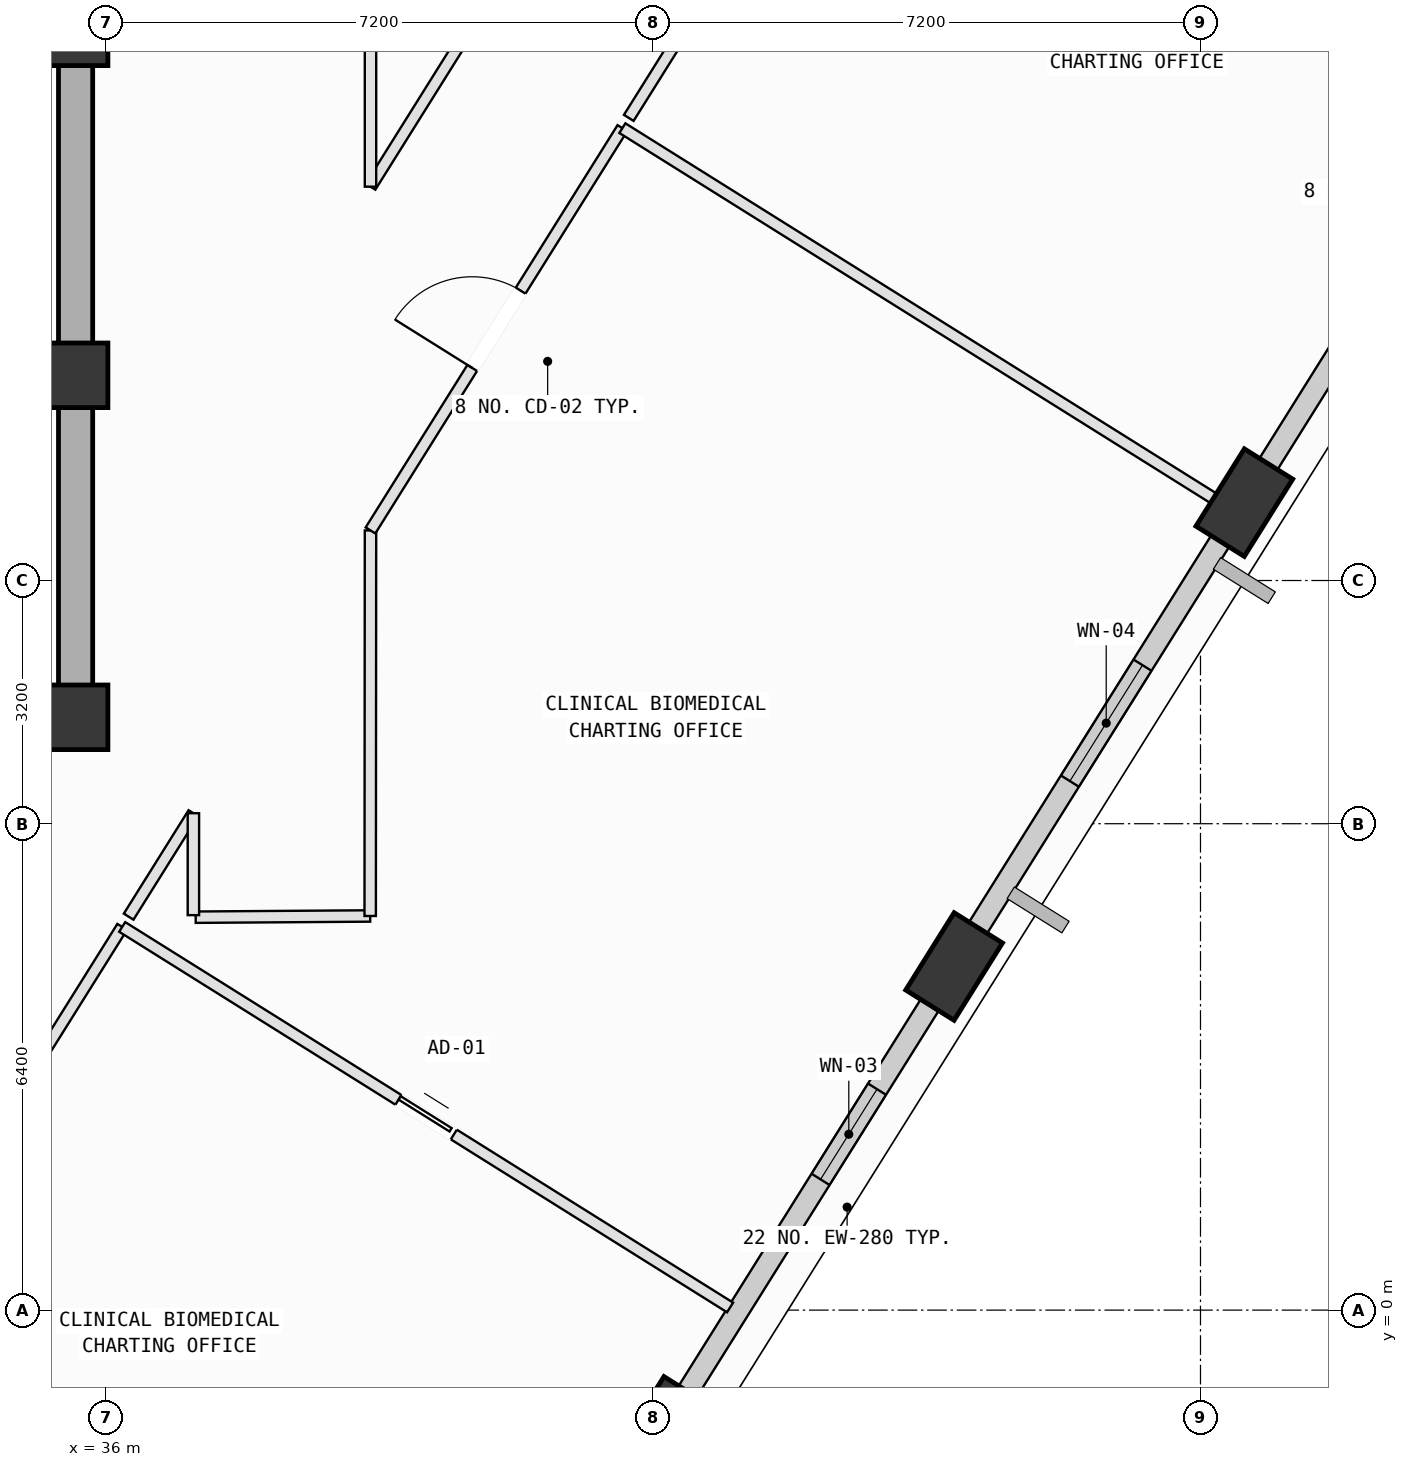
"""IFC4 building model, lengths in metres.
Left out: names, types, materials, properties, quantities, classifications, styles, units other than length and angle.
Written with IfcOpenShell. Run it as: python <this file> out.ifc"""

import sys

from ifc_helpers import new_model, si_unit, direction, frame, frame_2d, origin, origin_2d, place, context, subcontext, project, spatial, rectangle, extrude, element, fill, save


model = new_model("IFC4")
c1 = context("Model", 3, precision=1e-05, world=origin(), true_north=direction((0.0, 1.0)))
c2 = subcontext(c1, "Body", "Model", "MODEL_VIEW")
j1 = project(units=[si_unit("LENGTHUNIT", "METRE"), si_unit("PLANEANGLEUNIT", "RADIAN")], contexts=[c1])
p1 = place(None, origin())
s1 = spatial("IfcSite", under=j1, at=p1, CompositionType="ELEMENT")
p2 = place(p1, origin())
s2 = spatial("IfcBuilding", under=s1, at=p2, CompositionType="ELEMENT")
p3 = place(p2, frame((0.0, 0.0, 272.6)))
s3 = spatial("IfcBuildingStorey", under=s2, at=p3, CompositionType="ELEMENT", Elevation=272.6)
for number, where, z_axis, x_axis in (
    (1, (35.6, 7.8, 0.0), (0.0, 0.0, 1.0), (1.0, 0.0, 0.0)),
    (2, (35.6, 12.3, 0.0), (0.0, 0.0, 1.0), (1.0, 0.0, 0.0)),
    (3, (35.6, 16.8, 0.0), (0.0, 0.0, 1.0), (1.0, 0.0, 0.0)),
):
    element("IfcColumn", number, at=place(p3, frame(where, z_axis=z_axis, x_axis=x_axis)), inside=s3, PredefinedType="COLUMN", context=c2, shape_type="SweptSolid", body=[
        extrude(rectangle(XDim=0.85, YDim=0.85, at=origin_2d()), origin(), (0.0, 0.0, 1.0), 4.0),
    ])
p4 = place(p3, frame((43.341, -1.582, 0.084), z_axis=(0.108305309246, 0.040955268542, 0.99327369137), x_axis=(-0.97515853256, 0.19857987532, 0.098142088287)))
e4 = element("IfcColumn", 4, at=p4, inside=s3, PredefinedType="COLUMN", context=c2, shape_type="SweptSolid", body=[
    extrude(rectangle(XDim=1.2, YDim=0.75, at=origin_2d()), origin(), (0.0, 0.0, 1.0), 3.94),
])
p5 = place(p3, frame((47.158, 4.521, 0.073), z_axis=(0.083183965211, 0.05657004777, 0.994927262481), x_axis=(-0.995728841282, -0.035412464892, 0.085264482463)))
e5 = element("IfcColumn", 5, at=p5, inside=s3, PredefinedType="COLUMN", context=c2, shape_type="SweptSolid", body=[
    extrude(rectangle(XDim=1.2, YDim=0.75, at=origin_2d()), origin(), (0.0, 0.0, 1.0), 3.945),
])
p6 = place(p3, frame((50.977, 10.625, 0.068), z_axis=(0.05795606308, 0.072182204498, 0.995706193667), x_axis=(-0.942163536267, -0.325840094684, 0.078460841345)))
e6 = element("IfcColumn", 6, at=p6, inside=s3, PredefinedType="COLUMN", context=c2, shape_type="SweptSolid", body=[
    extrude(rectangle(XDim=1.2, YDim=0.75, at=origin_2d()), origin(), (0.0, 0.0, 1.0), 3.947),
])
p7 = place(p3, frame((47.044, 4.344, 0.0), z_axis=(0.0, 0.0, 1.0), x_axis=(-0.53066340858, -0.847582648946, 0.0)))
e7 = element("IfcWall", 7, at=p7, inside=s3, PredefinedType="SOLIDWALL", context=c2, shape_type="SweptSolid", body=[
    extrude(rectangle(XDim=6.439, YDim=0.28, at=frame_2d((3.219, 0.0))), origin(), (0.0, 0.0, 1.0), 3.265),
])
p8 = place(p7, frame((1.695, 0.0, 0.75)))
e8 = element("IfcOpeningElement", 8, at=p8, cuts=e7, PredefinedType="OPENING", context=c2, shape_type="SweptSolid", body=[
    extrude(rectangle(XDim=1.4, YDim=1.85, at=frame_2d((0.7, 0.925))), frame((0.0, 0.15, 0.0), z_axis=(0.0, -1.0, 0.0), x_axis=(1.0, 0.0, 0.0)), (0.0, 0.0, 1.0), 0.3),
])
p9 = place(p3, frame((50.86, 10.44, 0.0), z_axis=(0.0, 0.0, 1.0), x_axis=(-0.530676257758, -0.847574604063, 0.0)))
e9 = element("IfcWall", 9, at=p9, inside=s3, PredefinedType="SOLIDWALL", context=c2, shape_type="SweptSolid", body=[
    extrude(rectangle(XDim=6.414, YDim=0.28, at=frame_2d((3.207, 0.0))), origin(), (0.0, 0.0, 1.0), 3.265),
])
p10 = place(p9, frame((2.305, 0.0, 0.75)))
e10 = element("IfcOpeningElement", 10, at=p10, cuts=e9, PredefinedType="OPENING", context=c2, shape_type="SweptSolid", body=[
    extrude(rectangle(XDim=1.8, YDim=2.05, at=frame_2d((0.9, 1.025))), frame((0.0, 0.15, 0.0), z_axis=(0.0, -1.0, 0.0), x_axis=(1.0, 0.0, 0.0)), (0.0, 0.0, 1.0), 0.3),
])
p11 = place(p3, frame((54.681, 16.543, 0.0), z_axis=(0.0, 0.0, 1.0), x_axis=(-0.530659848468, -0.847584877888, 0.0)))
e11 = element("IfcWall", 11, at=p11, inside=s3, PredefinedType="SOLIDWALL", context=c2, shape_type="SweptSolid", body=[
    extrude(rectangle(XDim=6.407, YDim=0.28, at=frame_2d((3.204, 0.0))), origin(), (0.0, 0.0, 1.0), 3.265),
])
p12 = place(p11, frame((2.604, 0.0, 0.75)))
e12 = element("IfcOpeningElement", 12, at=p12, cuts=e11, PredefinedType="OPENING", context=c2, shape_type="SweptSolid", body=[
    extrude(rectangle(XDim=1.2, YDim=1.75, at=frame_2d((0.6, 0.875))), frame((0.0, 0.15, 0.0), z_axis=(0.0, -1.0, 0.0), x_axis=(1.0, 0.0, 0.0)), (0.0, 0.0, 1.0), 0.3),
])
p13 = place(p11, frame((0.637, 0.0, 0.75)))
e13 = element("IfcOpeningElement", 13, at=p13, cuts=e11, PredefinedType="OPENING", context=c2, shape_type="SweptSolid", body=[
    extrude(rectangle(XDim=1.2, YDim=1.75, at=frame_2d((0.6, 0.875))), frame((0.0, 0.15, 0.0), z_axis=(0.0, -1.0, 0.0), x_axis=(1.0, 0.0, 0.0)), (0.0, 0.0, 1.0), 0.3),
])
p14 = place(p3, frame((24.8, 7.8, 0.0), z_axis=(0.0, 0.0, 1.0), x_axis=(1.0, 0.0, 0.0)))
e14 = element("IfcWall", 14, at=p14, inside=s3, PredefinedType="SHEAR", context=c2, shape_type="SweptSolid", body=[
    extrude(rectangle(XDim=10.8, YDim=0.45, at=frame_2d((5.4, 0.0))), origin(), (0.0, 0.0, 1.0), 3.78),
])
p15 = place(p3, frame((35.6, 7.8, 0.0), z_axis=(0.0, 0.0, 1.0), x_axis=(0.0, 1.0, 0.0)))
e15 = element("IfcWall", 15, at=p15, inside=s3, PredefinedType="SHEAR", context=c2, shape_type="SweptSolid", body=[
    extrude(rectangle(XDim=9.0, YDim=0.45, at=frame_2d((4.5, 0.0))), origin(), (0.0, 0.0, 1.0), 3.78),
])
p16 = place(p3, frame((29.859, -5.108, 0.0), z_axis=(0.0, 0.0, 1.0), x_axis=(0.530618227444, 0.847610934748, 0.0)))
e16 = element("IfcWall", 16, at=p16, inside=s3, PredefinedType="PARTITIONING", context=c2, shape_type="SweptSolid", body=[
    extrude(rectangle(XDim=11.975, YDim=0.15, at=frame_2d((5.987, 0.0))), origin(), (0.0, 0.0, 1.0), 2.765),
])
p17 = place(p3, frame((36.213, 5.042, 0.0), z_axis=(0.0, 0.0, 1.0), x_axis=(0.84760270386, -0.530631375259, 0.0)))
e17 = element("IfcWall", 17, at=p17, inside=s3, PredefinedType="PARTITIONING", context=c2, shape_type="SweptSolid", body=[
    extrude(rectangle(XDim=9.436, YDim=0.15, at=frame_2d((4.718, 0.0))), origin(), (0.0, 0.0, 1.0), 2.765),
])
p18 = place(p17, frame((4.288, 0.0, 0.0)))
e18 = element("IfcOpeningElement", 18, at=p18, cuts=e17, PredefinedType="OPENING", context=c2, shape_type="SweptSolid", body=[
    extrude(rectangle(XDim=0.86, YDim=2.06, at=frame_2d((0.43, 1.03))), frame((0.0, 0.085, 0.0), z_axis=(0.0, -1.0, 0.0), x_axis=(1.0, 0.0, 0.0)), (0.0, 0.0, 1.0), 0.17),
])
p19 = place(p3, frame((37.18, 5.17, 0.0), z_axis=(0.0, 0.0, 1.0), x_axis=(0.999975377948, 0.007017371073, 0.0)))
e19 = element("IfcWall", 19, at=p19, inside=s3, PredefinedType="PARTITIONING", context=c2, shape_type="SweptSolid", body=[
    extrude(rectangle(XDim=2.296, YDim=0.15, at=frame_2d((1.148, 0.0))), origin(), (0.0, 0.0, 1.0), 3.78),
])
p20 = place(p3, frame((39.476, 5.186, 0.0), z_axis=(0.0, 0.0, 1.0), x_axis=(0.000770007953, 0.999999703544, 0.0)))
e20 = element("IfcWall", 20, at=p20, inside=s3, PredefinedType="PARTITIONING", context=c2, shape_type="SweptSolid", body=[
    extrude(rectangle(XDim=5.073, YDim=0.15, at=frame_2d((2.537, 0.0))), origin(), (0.0, 0.0, 1.0), 3.78),
])
p21 = place(p3, frame((39.48, 10.259, 0.0), z_axis=(0.0, 0.0, 1.0), x_axis=(0.530673487846, 0.84757633833, 0.0)))
e21 = element("IfcWall", 21, at=p21, inside=s3, PredefinedType="PARTITIONING", context=c2, shape_type="SweptSolid", body=[
    extrude(rectangle(XDim=6.245, YDim=0.15, at=frame_2d((3.123, 0.0))), origin(), (0.0, 0.0, 1.0), 3.78),
])
p22 = place(p21, frame((2.522, 0.0, 0.0)))
e22 = element("IfcOpeningElement", 22, at=p22, cuts=e21, PredefinedType="OPENING", context=c2, shape_type="SweptSolid", body=[
    extrude(rectangle(XDim=1.2, YDim=2.15, at=frame_2d((0.6, 1.075))), frame((0.0, 0.085, 0.0), z_axis=(0.0, -1.0, 0.0), x_axis=(1.0, 0.0, 0.0)), (0.0, 0.0, 1.0), 0.17),
])
p23 = place(p3, frame((42.794, 15.552, 0.0), z_axis=(0.0, 0.0, 1.0), x_axis=(0.84754648377, -0.530721167704, 0.0)))
e23 = element("IfcWall", 23, at=p23, inside=s3, PredefinedType="PARTITIONING", context=c2, shape_type="SweptSolid", body=[
    extrude(rectangle(XDim=9.447, YDim=0.15, at=frame_2d((4.724, 0.0))), origin(), (0.0, 0.0, 1.0), 3.78),
])
p24 = place(p3, frame((47.652, 4.882, 0.0), z_axis=(0.0, 0.0, 1.0), x_axis=(-0.530449748076, -0.847716382268, 0.0)))
e24 = element("IfcWall", 24, at=p24, inside=s3, PredefinedType="PARTITIONING", context=c2, shape_type="SweptSolid", body=[
    extrude(rectangle(XDim=0.779, YDim=0.15, at=frame_2d((0.389, 0.0))), origin(), (0.0, 0.0, 1.0), 3.265),
])
p25 = place(p3, frame((36.298, 5.177, 0.0), z_axis=(0.0, 0.0, 1.0), x_axis=(0.53050454214, 0.847682092986, 0.0)))
e25 = element("IfcWall", 25, at=p25, inside=s3, PredefinedType="PARTITIONING", context=c2, shape_type="SweptSolid", body=[
    extrude(rectangle(XDim=1.606, YDim=0.15, at=frame_2d((0.803, 0.0))), origin(), (0.0, 0.0, 1.0), 3.78),
])
p26 = place(p3, frame((37.15, 6.538, 0.0), z_axis=(0.0, 0.0, 1.0), x_axis=(0.0, -1.0, 0.0)))
e26 = element("IfcWall", 26, at=p26, inside=s3, PredefinedType="PARTITIONING", context=c2, shape_type="SweptSolid", body=[
    extrude(rectangle(XDim=1.341, YDim=0.15, at=frame_2d((0.67, 0.0))), origin(), (0.0, 0.0, 1.0), 3.78),
])
p27 = place(p3, frame((42.878, 15.687, 0.0), z_axis=(0.0, 0.0, 1.0), x_axis=(0.530687191851, 0.847567758002, 0.0)))
e27 = element("IfcWall", 27, at=p27, inside=s3, PredefinedType="PARTITIONING", context=c2, shape_type="SweptSolid", body=[
    extrude(rectangle(XDim=12.241, YDim=0.15, at=frame_2d((6.121, 0.0))), origin(), (0.0, 0.0, 1.0), 3.415),
])
p28 = place(p27, frame((5.521, 0.0, 0.0)))
e28 = element("IfcOpeningElement", 28, at=p28, cuts=e27, PredefinedType="OPENING", context=c2, shape_type="SweptSolid", body=[
    extrude(rectangle(XDim=1.2, YDim=2.15, at=frame_2d((0.6, 1.075))), frame((0.0, 0.085, 0.0), z_axis=(0.0, -1.0, 0.0), x_axis=(1.0, 0.0, 0.0)), (0.0, 0.0, 1.0), 0.17),
])
p29 = place(p3, frame((51.476, 10.991, 0.0), z_axis=(0.0, 0.0, 1.0), x_axis=(-0.530036692051, -0.847974707806, 0.0)))
e29 = element("IfcWall", 29, at=p29, inside=s3, PredefinedType="PARTITIONING", context=c2, shape_type="SweptSolid", body=[
    extrude(rectangle(XDim=0.581, YDim=0.15, at=frame_2d((0.291, 0.0))), origin(), (0.0, 0.0, 1.0), 3.265),
])
p30 = place(p3, frame((42.514, 19.628, 0.0), z_axis=(0.0, 0.0, 1.0), x_axis=(-0.530655141338, -0.847587824931, 0.0)))
e30 = element("IfcWall", 30, at=p30, inside=s3, PredefinedType="PARTITIONING", context=c2, shape_type="SweptSolid", body=[
    extrude(rectangle(XDim=5.717, YDim=0.15, at=frame_2d((2.859, 0.0))), origin(), (0.0, 0.0, 1.0), 3.78),
])
p31 = place(p3, frame((39.48, 14.782, 0.0), z_axis=(0.0, 0.0, 1.0), x_axis=(0.0, 1.0, 0.0)))
e31 = element("IfcWall", 31, at=p31, inside=s3, PredefinedType="PARTITIONING", context=c2, shape_type="SweptSolid", body=[
    extrude(rectangle(XDim=6.071, YDim=0.15, at=frame_2d((3.036, 0.0))), origin(), (0.0, 0.0, 1.0), 3.78),
])
p32 = place(p8, origin())
e32 = element("IfcWindow", 32, at=p32, inside=s3, PartitioningType="SINGLE_PANEL", PredefinedType="WINDOW", context=c2, shape_type="SweptSolid", body=[
    extrude(rectangle(XDim=1.4, YDim=1.85, at=frame_2d((0.7, 0.925))), frame((0.0, 0.03, 0.0), z_axis=(0.0, -1.0, 0.0), x_axis=(1.0, 0.0, 0.0)), (0.0, 0.0, 1.0), 0.06),
])
fill(e8, e32)
p33 = place(p10, origin())
e33 = element("IfcWindow", 33, at=p33, inside=s3, PartitioningType="SINGLE_PANEL", PredefinedType="WINDOW", context=c2, shape_type="SweptSolid", body=[
    extrude(rectangle(XDim=1.8, YDim=2.05, at=frame_2d((0.9, 1.025))), frame((0.0, 0.03, 0.0), z_axis=(0.0, -1.0, 0.0), x_axis=(1.0, 0.0, 0.0)), (0.0, 0.0, 1.0), 0.06),
])
fill(e10, e33)
p34 = place(p22, origin())
e34 = element("IfcDoor", 34, at=p34, inside=s3, OperationType="SINGLE_SWING_LEFT", PredefinedType="DOOR", context=c2, shape_type="SweptSolid", body=[
    extrude(rectangle(XDim=1.2, YDim=2.15, at=frame_2d((0.6, 1.075))), frame((0.0, 0.025, 0.0), z_axis=(0.0, -1.0, 0.0), x_axis=(1.0, 0.0, 0.0)), (0.0, 0.0, 1.0), 0.05),
])
fill(e22, e34)
p35 = place(p18, origin())
e35 = element("IfcDoor", 35, at=p35, inside=s3, OperationType="SLIDING_TO_LEFT", PredefinedType="DOOR", context=c2, shape_type="SweptSolid", body=[
    extrude(rectangle(XDim=0.86, YDim=2.06, at=frame_2d((0.43, 1.03))), frame((0.0, 0.025, 0.0), z_axis=(0.0, -1.0, 0.0), x_axis=(1.0, 0.0, 0.0)), (0.0, 0.0, 1.0), 0.05),
])
fill(e18, e35)
save(model, sys.argv[1])
